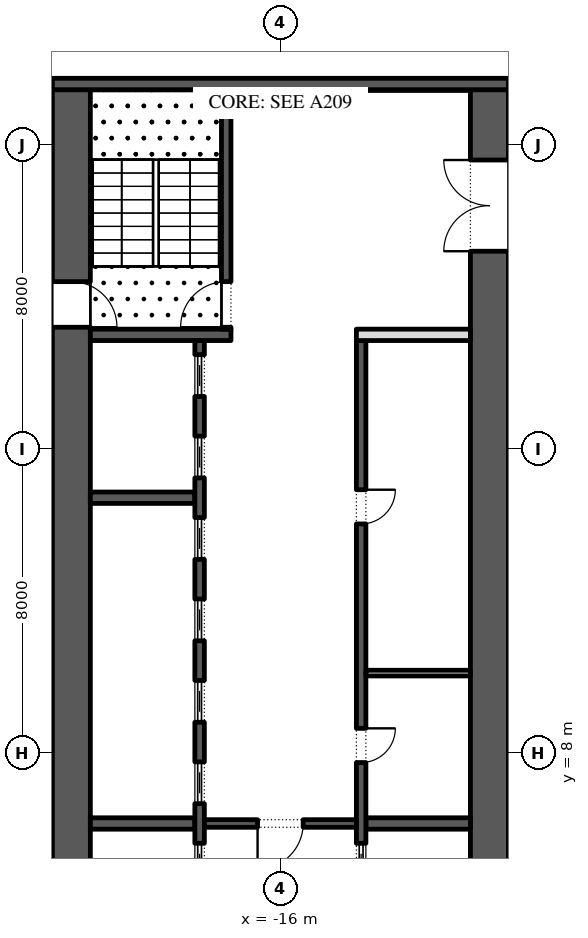
"""IFC4 building model, lengths in metres.
Left out: names, types, materials, properties, quantities, classifications, styles, units other than length and angle.
Written with IfcOpenShell. Run it as: python <this file> out.ifc"""

import sys

from ifc_helpers import new_model, si_unit, direction, frame, frame_2d, origin, place, context, subcontext, project, spatial, rectangle, extrude, element, fill, save


model = new_model("IFC4")
c1 = context("Model", 3, precision=1e-05, world=origin(), true_north=direction((0.0, 1.0)))
c2 = subcontext(c1, "Body", "Model", "MODEL_VIEW")
j1 = project(units=[si_unit("LENGTHUNIT", "METRE"), si_unit("PLANEANGLEUNIT", "RADIAN")], contexts=[c1])
p1 = place(None, origin())
s1 = spatial("IfcSite", under=j1, at=p1, CompositionType="ELEMENT")
p2 = place(p1, origin())
s2 = spatial("IfcBuilding", under=s1, at=p2, CompositionType="ELEMENT")
p3 = place(p2, frame((0.0, 0.0, 33.6)))
s3 = spatial("IfcBuildingStorey", under=s2, at=p3, CompositionType="ELEMENT", Elevation=33.6)
p4 = place(p3, frame((-21.5, -2.45, 0.0), z_axis=(0.0, 0.0, 1.0), x_axis=(0.0, 1.0, 0.0)))
e1 = element("IfcWall", 1, at=p4, inside=s3, PredefinedType="SHEAR", context=c2, shape_type="SweptSolid", body=[
    extrude(rectangle(XDim=27.9, YDim=1.0, at=frame_2d((13.95, 0.0))), origin(), (0.0, 0.0, 1.0), 5.8),
])
p5 = place(p4, frame((5.05, 0.0, 0.0)))
e2 = element("IfcOpeningElement", 2, at=p5, cuts=e1, PredefinedType="OPENING", context=c2, shape_type="SweptSolid", body=[
    extrude(rectangle(XDim=1.2, YDim=2.1, at=frame_2d((0.6, 1.05))), frame((0.0, 0.51, 0.0), z_axis=(0.0, -1.0, 0.0), x_axis=(1.0, 0.0, 0.0)), (0.0, 0.0, 1.0), 1.02),
])
p6 = place(p4, frame((21.65, 0.0, 0.0)))
e3 = element("IfcOpeningElement", 3, at=p6, cuts=e1, PredefinedType="OPENING", context=c2, shape_type="SweptSolid", body=[
    extrude(rectangle(XDim=1.2, YDim=2.1, at=frame_2d((0.6, 1.05))), frame((0.0, 0.51, 0.0), z_axis=(0.0, -1.0, 0.0), x_axis=(1.0, 0.0, 0.0)), (0.0, 0.0, 1.0), 1.02),
])
p7 = place(p3, frame((-10.5, -2.45, 0.0), z_axis=(0.0, 0.0, 1.0), x_axis=(0.0, 1.0, 0.0)))
e4 = element("IfcWall", 4, at=p7, inside=s3, PredefinedType="SHEAR", context=c2, shape_type="SweptSolid", body=[
    extrude(rectangle(XDim=27.9, YDim=1.0, at=frame_2d((13.95, 0.0))), origin(), (0.0, 0.0, 1.0), 5.8),
])
p8 = place(p7, frame((23.65, 0.0, 0.0)))
e5 = element("IfcOpeningElement", 5, at=p8, cuts=e4, PredefinedType="OPENING", context=c2, shape_type="SweptSolid", body=[
    extrude(rectangle(XDim=2.4, YDim=2.1, at=frame_2d((1.2, 1.05))), frame((0.0, 0.51, 0.0), z_axis=(0.0, -1.0, 0.0), x_axis=(1.0, 0.0, 0.0)), (0.0, 0.0, 1.0), 1.02),
])
p9 = place(p7, frame((2.7, 0.0, 0.0)))
e6 = element("IfcOpeningElement", 6, at=p9, cuts=e4, PredefinedType="OPENING", context=c2, shape_type="SweptSolid", body=[
    extrude(rectangle(XDim=0.9, YDim=2.1, at=frame_2d((0.45, 1.05))), frame((0.0, 0.51, 0.0), z_axis=(0.0, -1.0, 0.0), x_axis=(1.0, 0.0, 0.0)), (0.0, 0.0, 1.0), 1.02),
])
p10 = place(p3, frame((-22.0, 25.6, 0.0), z_axis=(0.0, 0.0, 1.0), x_axis=(1.0, 0.0, 0.0)))
e7 = element("IfcWall", 7, at=p10, inside=s3, PredefinedType="SHEAR", context=c2, shape_type="SweptSolid", body=[
    extrude(rectangle(XDim=12.0, YDim=0.3, at=frame_2d((6.0, 0.0))), origin(), (0.0, 0.0, 1.0), 5.8),
])
p11 = place(p3, frame((-21.0, 19.0, 0.0), z_axis=(0.0, 0.0, 1.0), x_axis=(1.0, 0.0, 0.0)))
e8 = element("IfcWall", 8, at=p11, inside=s3, PredefinedType="SHEAR", context=c2, shape_type="SweptSolid", body=[
    extrude(rectangle(XDim=3.7, YDim=0.3, at=frame_2d((1.85, 0.0))), origin(), (0.0, 0.0, 1.0), 5.8),
])
p12 = place(p3, frame((-17.425, 19.15, 0.0), z_axis=(0.0, 0.0, 1.0), x_axis=(0.0, 1.0, 0.0)))
e9 = element("IfcWall", 9, at=p12, inside=s3, PredefinedType="SHEAR", context=c2, shape_type="SweptSolid", body=[
    extrude(rectangle(XDim=6.3, YDim=0.25, at=frame_2d((3.15, 0.0))), origin(), (0.0, 0.0, 1.0), 5.8),
])
p13 = place(p12, frame((0.05, 0.0, 0.0)))
e10 = element("IfcOpeningElement", 10, at=p13, cuts=e9, PredefinedType="OPENING", context=c2, shape_type="SweptSolid", body=[
    extrude(rectangle(XDim=1.2, YDim=2.1, at=frame_2d((0.6, 1.05))), frame((0.0, 0.135, 0.0), z_axis=(0.0, -1.0, 0.0), x_axis=(1.0, 0.0, 0.0)), (0.0, 0.0, 1.0), 0.27),
])
for number, where, z_axis, x_axis in (
    (11, (-21.0, 6.143, 0.0), (0.0, 0.0, 1.0), (1.0, 0.0, 0.0)),
    (12, (-21.0, 14.714, 0.0), (0.0, 0.0, 1.0), (1.0, 0.0, 0.0)),
):
    element("IfcWall", number, at=place(p3, frame(where, z_axis=z_axis, x_axis=x_axis)), inside=s3, PredefinedType="SHEAR", context=c2, shape_type="SweptSolid", body=[
        extrude(rectangle(XDim=2.75, YDim=0.3, at=frame_2d((1.375, 0.0))), origin(), (0.0, 0.0, 1.0), 5.8),
    ])
p14 = place(p3, frame((-18.125, 4.15, 0.0), z_axis=(0.0, 0.0, 1.0), x_axis=(0.0, 1.0, 0.0)))
e13 = element("IfcWall", 13, at=p14, inside=s3, PredefinedType="SHEAR", context=c2, shape_type="SweptSolid", body=[
    extrude(rectangle(XDim=14.7, YDim=0.25, at=frame_2d((7.35, 0.0))), origin(), (0.0, 0.0, 1.0), 5.8),
])
p15 = place(p14, frame((0.371, 0.0, 0.0)))
e14 = element("IfcOpeningElement", 14, at=p15, cuts=e13, PredefinedType="OPENING", context=c2, shape_type="SweptSolid", body=[
    extrude(rectangle(XDim=1.1, YDim=2.1, at=frame_2d((0.55, 1.05))), frame((0.0, 0.135, 0.0), z_axis=(0.0, -1.0, 0.0), x_axis=(1.0, 0.0, 0.0)), (0.0, 0.0, 1.0), 0.27),
])
p16 = place(p14, frame((2.514, 0.0, 0.0)))
e15 = element("IfcOpeningElement", 15, at=p16, cuts=e13, PredefinedType="OPENING", context=c2, shape_type="SweptSolid", body=[
    extrude(rectangle(XDim=1.1, YDim=2.1, at=frame_2d((0.55, 1.05))), frame((0.0, 0.135, 0.0), z_axis=(0.0, -1.0, 0.0), x_axis=(1.0, 0.0, 0.0)), (0.0, 0.0, 1.0), 0.27),
])
p17 = place(p14, frame((4.657, 0.0, 0.0)))
e16 = element("IfcOpeningElement", 16, at=p17, cuts=e13, PredefinedType="OPENING", context=c2, shape_type="SweptSolid", body=[
    extrude(rectangle(XDim=1.1, YDim=2.1, at=frame_2d((0.55, 1.05))), frame((0.0, 0.135, 0.0), z_axis=(0.0, -1.0, 0.0), x_axis=(1.0, 0.0, 0.0)), (0.0, 0.0, 1.0), 0.27),
])
p18 = place(p14, frame((6.8, 0.0, 0.0)))
e17 = element("IfcOpeningElement", 17, at=p18, cuts=e13, PredefinedType="OPENING", context=c2, shape_type="SweptSolid", body=[
    extrude(rectangle(XDim=1.1, YDim=2.1, at=frame_2d((0.55, 1.05))), frame((0.0, 0.135, 0.0), z_axis=(0.0, -1.0, 0.0), x_axis=(1.0, 0.0, 0.0)), (0.0, 0.0, 1.0), 0.27),
])
p19 = place(p14, frame((8.943, 0.0, 0.0)))
e18 = element("IfcOpeningElement", 18, at=p19, cuts=e13, PredefinedType="OPENING", context=c2, shape_type="SweptSolid", body=[
    extrude(rectangle(XDim=1.1, YDim=2.1, at=frame_2d((0.55, 1.05))), frame((0.0, 0.135, 0.0), z_axis=(0.0, -1.0, 0.0), x_axis=(1.0, 0.0, 0.0)), (0.0, 0.0, 1.0), 0.27),
])
p20 = place(p14, frame((11.086, 0.0, 0.0)))
e19 = element("IfcOpeningElement", 19, at=p20, cuts=e13, PredefinedType="OPENING", context=c2, shape_type="SweptSolid", body=[
    extrude(rectangle(XDim=1.1, YDim=2.1, at=frame_2d((0.55, 1.05))), frame((0.0, 0.135, 0.0), z_axis=(0.0, -1.0, 0.0), x_axis=(1.0, 0.0, 0.0)), (0.0, 0.0, 1.0), 0.27),
])
p21 = place(p14, frame((13.229, 0.0, 0.0)))
e20 = element("IfcOpeningElement", 20, at=p21, cuts=e13, PredefinedType="OPENING", context=c2, shape_type="SweptSolid", body=[
    extrude(rectangle(XDim=1.1, YDim=2.1, at=frame_2d((0.55, 1.05))), frame((0.0, 0.135, 0.0), z_axis=(0.0, -1.0, 0.0), x_axis=(1.0, 0.0, 0.0)), (0.0, 0.0, 1.0), 0.27),
])
p22 = place(p3, frame((-13.75, 6.143, 0.0), z_axis=(0.0, 0.0, 1.0), x_axis=(1.0, 0.0, 0.0)))
e21 = element("IfcWall", 21, at=p22, inside=s3, PredefinedType="SHEAR", context=c2, shape_type="SweptSolid", body=[
    extrude(rectangle(XDim=2.75, YDim=0.3, at=frame_2d((1.375, 0.0))), origin(), (0.0, 0.0, 1.0), 5.8),
])
p23 = place(p3, frame((-13.875, -2.45, 0.0), z_axis=(0.0, 0.0, 1.0), x_axis=(0.0, 1.0, 0.0)))
e22 = element("IfcWall", 22, at=p23, inside=s3, PredefinedType="SHEAR", context=c2, shape_type="SweptSolid", body=[
    extrude(rectangle(XDim=21.3, YDim=0.25, at=frame_2d((10.65, 0.0))), origin(), (0.0, 0.0, 1.0), 5.8),
])
p24 = place(p23, frame((10.196, 0.0, 0.0)))
e23 = element("IfcOpeningElement", 23, at=p24, cuts=e22, PredefinedType="OPENING", context=c2, shape_type="SweptSolid", body=[
    extrude(rectangle(XDim=0.9, YDim=2.1, at=frame_2d((0.45, 1.05))), frame((0.0, 0.135, 0.0), z_axis=(0.0, -1.0, 0.0), x_axis=(1.0, 0.0, 0.0)), (0.0, 0.0, 1.0), 0.27),
])
p25 = place(p23, frame((16.475, 0.0, 0.0)))
e24 = element("IfcOpeningElement", 24, at=p25, cuts=e22, PredefinedType="OPENING", context=c2, shape_type="SweptSolid", body=[
    extrude(rectangle(XDim=0.9, YDim=2.1, at=frame_2d((0.45, 1.05))), frame((0.0, 0.135, 0.0), z_axis=(0.0, -1.0, 0.0), x_axis=(1.0, 0.0, 0.0)), (0.0, 0.0, 1.0), 0.27),
])
p26 = place(p23, frame((6.971, 0.0, 0.0)))
e25 = element("IfcOpeningElement", 25, at=p26, cuts=e22, PredefinedType="OPENING", context=c2, shape_type="SweptSolid", body=[
    extrude(rectangle(XDim=1.1, YDim=2.1, at=frame_2d((0.55, 1.05))), frame((0.0, 0.135, 0.0), z_axis=(0.0, -1.0, 0.0), x_axis=(1.0, 0.0, 0.0)), (0.0, 0.0, 1.0), 0.27),
])
p27 = place(p3, frame((-14.0, 19.0, 0.0), z_axis=(0.0, 0.0, 1.0), x_axis=(1.0, 0.0, 0.0)))
e26 = element("IfcWall", 26, at=p27, inside=s3, PredefinedType="PARTITIONING", context=c2, shape_type="SweptSolid", body=[
    extrude(rectangle(XDim=3.0, YDim=0.3, at=frame_2d((1.5, 0.0))), origin(), (0.0, 0.0, 1.0), 5.8),
])
p28 = place(p3, frame((-13.75, 10.1, 0.0), z_axis=(0.0, 0.0, 1.0), x_axis=(1.0, 0.0, 0.0)))
e27 = element("IfcWall", 27, at=p28, inside=s3, PredefinedType="PARTITIONING", context=c2, shape_type="SweptSolid", body=[
    extrude(rectangle(XDim=2.75, YDim=0.15, at=frame_2d((1.375, 0.0))), origin(), (0.0, 0.0, 1.0), 5.8),
])
p29 = place(p3, frame((-18.0, 6.143, 0.0), z_axis=(0.0, 0.0, 1.0), x_axis=(1.0, 0.0, 0.0)))
e28 = element("IfcWall", 28, at=p29, inside=s3, PredefinedType="SHEAR", context=c2, shape_type="SweptSolid", body=[
    extrude(rectangle(XDim=4.0, YDim=0.2, at=frame_2d((2.0, 0.0))), origin(), (0.0, 0.0, 1.0), 5.8),
])
p30 = place(p29, frame((1.4, 0.0, 0.0)))
e29 = element("IfcOpeningElement", 29, at=p30, cuts=e28, PredefinedType="OPENING", context=c2, shape_type="SweptSolid", body=[
    extrude(rectangle(XDim=1.2, YDim=2.1, at=frame_2d((0.6, 1.05))), frame((0.0, 0.11, 0.0), z_axis=(0.0, -1.0, 0.0), x_axis=(1.0, 0.0, 0.0)), (0.0, 0.0, 1.0), 0.22),
])
p31 = place(p15, origin())
e30 = element("IfcDoor", 30, at=p31, inside=s3, OperationType="SLIDING_TO_LEFT", PredefinedType="DOOR", context=c2, shape_type="SweptSolid", body=[
    extrude(rectangle(XDim=1.1, YDim=2.1, at=frame_2d((0.55, 1.05))), frame((0.0, 0.025, 0.0), z_axis=(0.0, -1.0, 0.0), x_axis=(1.0, 0.0, 0.0)), (0.0, 0.0, 1.0), 0.05),
])
fill(e14, e30)
p32 = place(p16, origin())
e31 = element("IfcDoor", 31, at=p32, inside=s3, OperationType="SLIDING_TO_LEFT", PredefinedType="DOOR", context=c2, shape_type="SweptSolid", body=[
    extrude(rectangle(XDim=1.1, YDim=2.1, at=frame_2d((0.55, 1.05))), frame((0.0, 0.025, 0.0), z_axis=(0.0, -1.0, 0.0), x_axis=(1.0, 0.0, 0.0)), (0.0, 0.0, 1.0), 0.05),
])
fill(e15, e31)
p33 = place(p17, origin())
e32 = element("IfcDoor", 32, at=p33, inside=s3, OperationType="SLIDING_TO_LEFT", PredefinedType="DOOR", context=c2, shape_type="SweptSolid", body=[
    extrude(rectangle(XDim=1.1, YDim=2.1, at=frame_2d((0.55, 1.05))), frame((0.0, 0.025, 0.0), z_axis=(0.0, -1.0, 0.0), x_axis=(1.0, 0.0, 0.0)), (0.0, 0.0, 1.0), 0.05),
])
fill(e16, e32)
p34 = place(p18, origin())
e33 = element("IfcDoor", 33, at=p34, inside=s3, OperationType="SLIDING_TO_LEFT", PredefinedType="DOOR", context=c2, shape_type="SweptSolid", body=[
    extrude(rectangle(XDim=1.1, YDim=2.1, at=frame_2d((0.55, 1.05))), frame((0.0, 0.025, 0.0), z_axis=(0.0, -1.0, 0.0), x_axis=(1.0, 0.0, 0.0)), (0.0, 0.0, 1.0), 0.05),
])
fill(e17, e33)
p35 = place(p19, origin())
e34 = element("IfcDoor", 34, at=p35, inside=s3, OperationType="SLIDING_TO_LEFT", PredefinedType="DOOR", context=c2, shape_type="SweptSolid", body=[
    extrude(rectangle(XDim=1.1, YDim=2.1, at=frame_2d((0.55, 1.05))), frame((0.0, 0.025, 0.0), z_axis=(0.0, -1.0, 0.0), x_axis=(1.0, 0.0, 0.0)), (0.0, 0.0, 1.0), 0.05),
])
fill(e18, e34)
p36 = place(p20, origin())
e35 = element("IfcDoor", 35, at=p36, inside=s3, OperationType="SLIDING_TO_LEFT", PredefinedType="DOOR", context=c2, shape_type="SweptSolid", body=[
    extrude(rectangle(XDim=1.1, YDim=2.1, at=frame_2d((0.55, 1.05))), frame((0.0, 0.025, 0.0), z_axis=(0.0, -1.0, 0.0), x_axis=(1.0, 0.0, 0.0)), (0.0, 0.0, 1.0), 0.05),
])
fill(e19, e35)
p37 = place(p21, origin())
e36 = element("IfcDoor", 36, at=p37, inside=s3, OperationType="SLIDING_TO_LEFT", PredefinedType="DOOR", context=c2, shape_type="SweptSolid", body=[
    extrude(rectangle(XDim=1.1, YDim=2.1, at=frame_2d((0.55, 1.05))), frame((0.0, 0.025, 0.0), z_axis=(0.0, -1.0, 0.0), x_axis=(1.0, 0.0, 0.0)), (0.0, 0.0, 1.0), 0.05),
])
fill(e20, e36)
p38 = place(p24, frame((0.9, -0.2, 0.0), z_axis=(0.0, 0.0, 1.0), x_axis=(-1.0, 0.0, 0.0)))
e37 = element("IfcDoor", 37, at=p38, inside=s3, OperationType="SINGLE_SWING_RIGHT", PredefinedType="DOOR", context=c2, shape_type="SweptSolid", body=[
    extrude(rectangle(XDim=0.9, YDim=2.1, at=frame_2d((0.45, 1.05))), frame((0.0, -0.075, 0.0), z_axis=(0.0, -1.0, 0.0), x_axis=(1.0, 0.0, 0.0)), (0.0, 0.0, 1.0), 0.05),
])
fill(e23, e37)
p39 = place(p25, frame((0.9, -0.2, 0.0), z_axis=(0.0, 0.0, 1.0), x_axis=(-1.0, 0.0, 0.0)))
e38 = element("IfcDoor", 38, at=p39, inside=s3, OperationType="SINGLE_SWING_RIGHT", PredefinedType="DOOR", context=c2, shape_type="SweptSolid", body=[
    extrude(rectangle(XDim=0.9, YDim=2.1, at=frame_2d((0.45, 1.05))), frame((0.0, -0.075, 0.0), z_axis=(0.0, -1.0, 0.0), x_axis=(1.0, 0.0, 0.0)), (0.0, 0.0, 1.0), 0.05),
])
fill(e24, e38)
p40 = place(p26, origin())
e39 = element("IfcDoor", 39, at=p40, inside=s3, OperationType="SLIDING_TO_LEFT", PredefinedType="DOOR", context=c2, shape_type="SweptSolid", body=[
    extrude(rectangle(XDim=1.1, YDim=2.1, at=frame_2d((0.55, 1.05))), frame((0.0, 0.025, 0.0), z_axis=(0.0, -1.0, 0.0), x_axis=(1.0, 0.0, 0.0)), (0.0, 0.0, 1.0), 0.05),
])
fill(e25, e39)
p41 = place(p30, frame((1.2, 0.0, 0.0), z_axis=(0.0, 0.0, 1.0), x_axis=(-1.0, 0.0, 0.0)))
e40 = element("IfcDoor", 40, at=p41, inside=s3, OperationType="SINGLE_SWING_LEFT", PredefinedType="DOOR", context=c2, shape_type="SweptSolid", body=[
    extrude(rectangle(XDim=1.2, YDim=2.1, at=frame_2d((0.6, 1.05))), frame((0.0, 0.025, 0.0), z_axis=(0.0, -1.0, 0.0), x_axis=(1.0, 0.0, 0.0)), (0.0, 0.0, 1.0), 0.05),
])
fill(e29, e40)
p42 = place(p8, origin())
e41 = element("IfcDoor", 41, at=p42, inside=s3, OperationType="DOUBLE_DOOR_SINGLE_SWING", PredefinedType="DOOR", context=c2, shape_type="SweptSolid", body=[
    extrude(rectangle(XDim=2.4, YDim=2.1, at=frame_2d((1.2, 1.05))), frame((0.0, 0.025, 0.0), z_axis=(0.0, -1.0, 0.0), x_axis=(1.0, 0.0, 0.0)), (0.0, 0.0, 1.0), 0.05),
])
fill(e5, e41)
p43 = place(p13, origin())
e42 = element("IfcDoor", 42, at=p43, inside=s3, OperationType="SINGLE_SWING_RIGHT", PredefinedType="DOOR", context=c2, shape_type="SweptSolid", body=[
    extrude(rectangle(XDim=1.2, YDim=2.1, at=frame_2d((0.6, 1.05))), frame((0.0, 0.025, 0.0), z_axis=(0.0, -1.0, 0.0), x_axis=(1.0, 0.0, 0.0)), (0.0, 0.0, 1.0), 0.05),
])
fill(e10, e42)
p44 = place(p6, frame((1.2, 0.0, 0.0), z_axis=(0.0, 0.0, 1.0), x_axis=(-1.0, 0.0, 0.0)))
e43 = element("IfcDoor", 43, at=p44, inside=s3, OperationType="SINGLE_SWING_LEFT", PredefinedType="DOOR", context=c2, shape_type="SweptSolid", body=[
    extrude(rectangle(XDim=1.2, YDim=2.1, at=frame_2d((0.6, 1.05))), frame((0.0, 0.025, 0.0), z_axis=(0.0, -1.0, 0.0), x_axis=(1.0, 0.0, 0.0)), (0.0, 0.0, 1.0), 0.05),
])
fill(e3, e43)
save(model, sys.argv[1])
